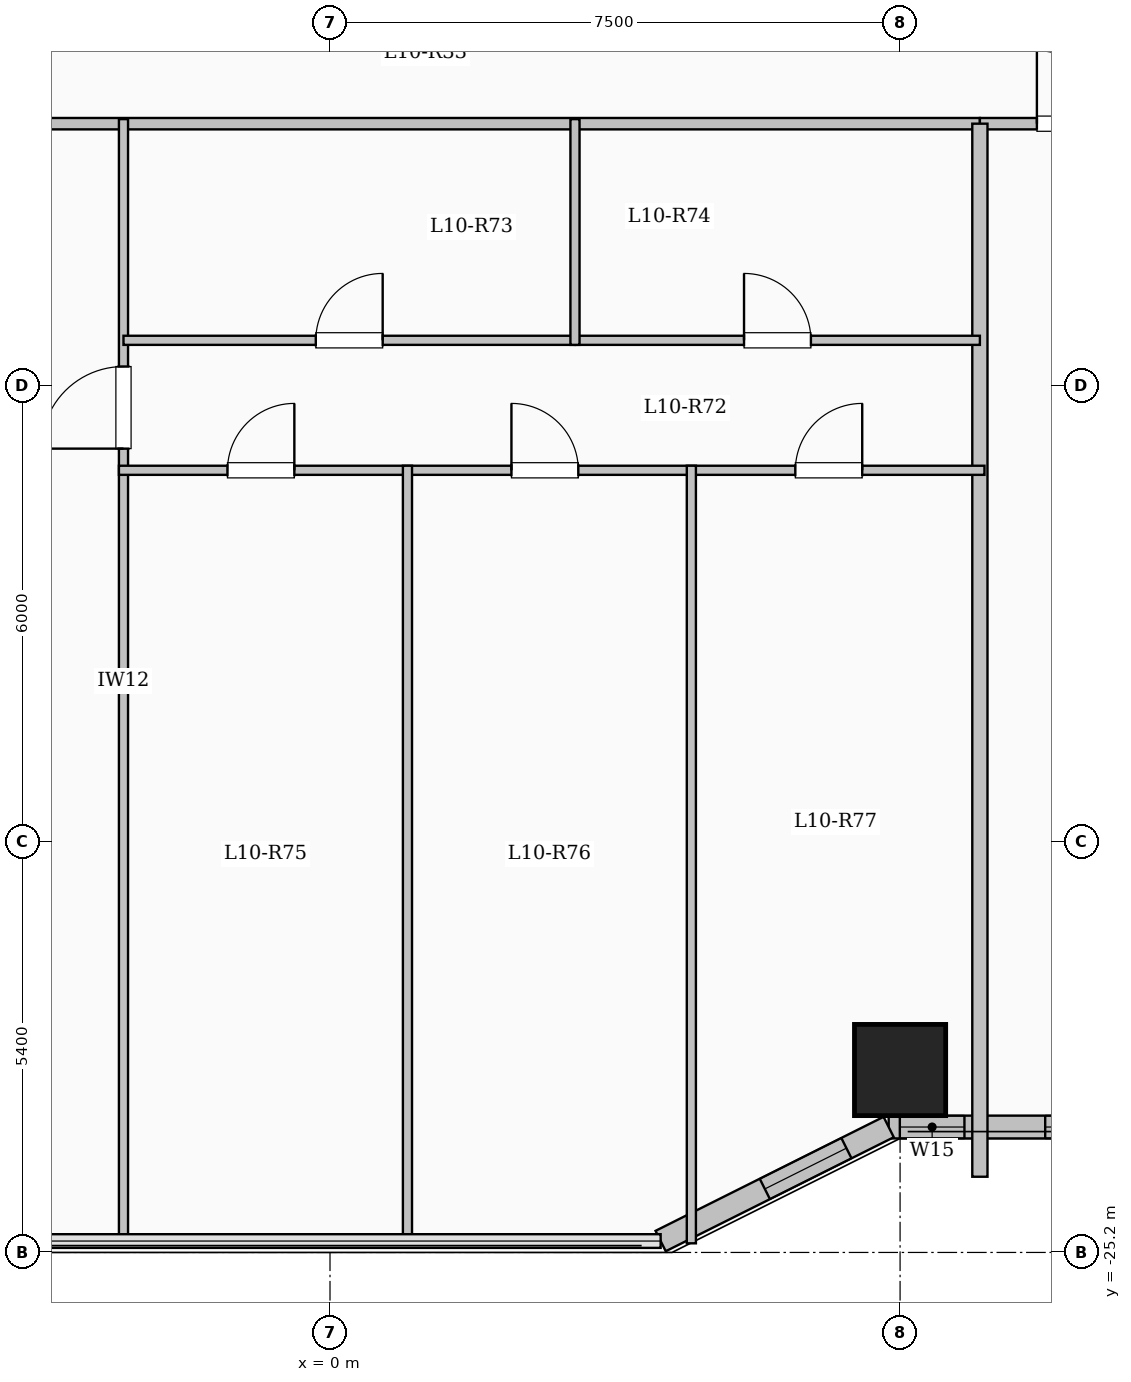
"""IFC4 building model, lengths in metres.
Left out: names, types, materials, properties, quantities, classifications, styles, units other than length and angle.
Written with IfcOpenShell. Run it as: python <this file> out.ifc"""

import sys

from ifc_helpers import new_model, si_unit, direction, frame, frame_2d, origin, origin_2d, place, context, subcontext, project, spatial, rectangle, extrude, element, fill, save


model = new_model("IFC4")
c1 = context("Model", 3, precision=1e-05, world=origin(), true_north=direction((0.0, 1.0)))
c2 = subcontext(c1, "Body", "Model", "MODEL_VIEW")
j1 = project(units=[si_unit("LENGTHUNIT", "METRE"), si_unit("PLANEANGLEUNIT", "RADIAN")], contexts=[c1])
p1 = place(None, origin())
s1 = spatial("IfcSite", under=j1, at=p1, CompositionType="ELEMENT")
p2 = place(p1, origin())
s2 = spatial("IfcBuilding", under=s1, at=p2, CompositionType="ELEMENT")
p3 = place(p2, frame((0.0, 0.0, 40.75)))
s3 = spatial("IfcBuildingStorey", under=s2, at=p3, CompositionType="ELEMENT", Elevation=40.75)
p4 = place(p3, frame((7.5, -22.8, 0.0), z_axis=(0.0, 0.0, 1.0), x_axis=(1.0, 0.0, 0.0)))
e1 = element("IfcColumn", 1, at=p4, inside=s3, PredefinedType="COLUMN", context=c2, shape_type="SweptSolid", body=[
    extrude(rectangle(XDim=1.2, YDim=1.2, at=origin_2d()), origin(), (0.0, 0.0, 1.0), 3.35),
])
p5 = place(p3, frame((22.65, -23.55, 0.0), z_axis=(0.0, 0.0, 1.0), x_axis=(-1.0, 0.0, 0.0)))
e2 = element("IfcWall", 2, at=p5, inside=s3, PredefinedType="SOLIDWALL", context=c2, shape_type="SweptSolid", body=[
    extrude(rectangle(XDim=15.3, YDim=0.3, at=frame_2d((7.65, 0.0))), origin(), (0.0, 0.0, 1.0), 3.1),
])
p6 = place(p5, frame((0.88, 0.0, 0.9)))
e3 = element("IfcOpeningElement", 3, at=p6, cuts=e2, PredefinedType="OPENING", context=c2, shape_type="SweptSolid", body=[
    extrude(rectangle(XDim=1.5, YDim=1.65, at=frame_2d((0.75, 0.825))), frame((0.0, 0.16, 0.0), z_axis=(0.0, -1.0, 0.0), x_axis=(1.0, 0.0, 0.0)), (0.0, 0.0, 1.0), 0.32),
])
p7 = place(p5, frame((4.091, 0.0, 0.9)))
e4 = element("IfcOpeningElement", 4, at=p7, cuts=e2, PredefinedType="OPENING", context=c2, shape_type="SweptSolid", body=[
    extrude(rectangle(XDim=1.5, YDim=1.65, at=frame_2d((0.75, 0.825))), frame((0.0, 0.16, 0.0), z_axis=(0.0, -1.0, 0.0), x_axis=(1.0, 0.0, 0.0)), (0.0, 0.0, 1.0), 0.32),
])
p8 = place(p5, frame((7.045, 0.0, 0.95)))
e5 = element("IfcOpeningElement", 5, at=p8, cuts=e2, PredefinedType="OPENING", context=c2, shape_type="SweptSolid", body=[
    extrude(rectangle(XDim=1.2, YDim=1.5, at=frame_2d((0.6, 0.75))), frame((0.0, 0.16, 0.0), z_axis=(0.0, -1.0, 0.0), x_axis=(1.0, 0.0, 0.0)), (0.0, 0.0, 1.0), 0.32),
])
p9 = place(p5, frame((9.212, 0.0, 0.95)))
e6 = element("IfcOpeningElement", 6, at=p9, cuts=e2, PredefinedType="OPENING", context=c2, shape_type="SweptSolid", body=[
    extrude(rectangle(XDim=1.2, YDim=1.5, at=frame_2d((0.6, 0.75))), frame((0.0, 0.16, 0.0), z_axis=(0.0, -1.0, 0.0), x_axis=(1.0, 0.0, 0.0)), (0.0, 0.0, 1.0), 0.32),
])
p10 = place(p5, frame((11.741, 0.0, 0.9)))
e7 = element("IfcOpeningElement", 7, at=p10, cuts=e2, PredefinedType="OPENING", context=c2, shape_type="SweptSolid", body=[
    extrude(rectangle(XDim=1.5, YDim=1.65, at=frame_2d((0.75, 0.825))), frame((0.0, 0.16, 0.0), z_axis=(0.0, -1.0, 0.0), x_axis=(1.0, 0.0, 0.0)), (0.0, 0.0, 1.0), 0.32),
])
p11 = place(p5, frame((14.303, 0.0, 0.95)))
e8 = element("IfcOpeningElement", 8, at=p11, cuts=e2, PredefinedType="OPENING", context=c2, shape_type="SweptSolid", body=[
    extrude(rectangle(XDim=0.85, YDim=1.5, at=frame_2d((0.425, 0.75))), frame((0.0, 0.16, 0.0), z_axis=(0.0, -1.0, 0.0), x_axis=(1.0, 0.0, 0.0)), (0.0, 0.0, 1.0), 0.32),
])
p12 = place(p3, frame((7.35, -23.55, 0.0), z_axis=(0.0, 0.0, 1.0), x_axis=(-0.894427191, -0.4472135955, 0.0)))
e9 = element("IfcWall", 9, at=p12, inside=s3, PredefinedType="SOLIDWALL", context=c2, shape_type="SweptSolid", body=[
    extrude(rectangle(XDim=3.354, YDim=0.3, at=frame_2d((1.677, 0.0))), origin(), (0.0, 0.0, 1.0), 3.1),
])
p13 = place(p12, frame((0.622, 0.0, 0.95)))
e10 = element("IfcOpeningElement", 10, at=p13, cuts=e9, PredefinedType="OPENING", context=c2, shape_type="SweptSolid", body=[
    extrude(rectangle(XDim=1.2, YDim=1.5, at=frame_2d((0.6, 0.75))), frame((0.0, 0.16, 0.0), z_axis=(0.0, -1.0, 0.0), x_axis=(1.0, 0.0, 0.0)), (0.0, 0.0, 1.0), 0.32),
])
p14 = place(p3, frame((-8.55, -10.35, 0.0), z_axis=(0.0, 0.0, 1.0), x_axis=(1.0, 0.0, 0.0)))
e11 = element("IfcWall", 11, at=p14, inside=s3, PredefinedType="PARTITIONING", context=c2, shape_type="SweptSolid", body=[
    extrude(rectangle(XDim=17.1, YDim=0.15, at=frame_2d((8.55, 0.0))), origin(), (0.0, 0.0, 1.0), 3.1),
])
p15 = place(p14, frame((0.8, 0.0, 0.0)))
e12 = element("IfcOpeningElement", 12, at=p15, cuts=e11, PredefinedType="OPENING", context=c2, shape_type="SweptSolid", body=[
    extrude(rectangle(XDim=0.96, YDim=2.15, at=frame_2d((0.48, 1.075))), frame((0.0, 0.085, 0.0), z_axis=(0.0, -1.0, 0.0), x_axis=(1.0, 0.0, 0.0)), (0.0, 0.0, 1.0), 0.17),
])
p16 = place(p3, frame((8.55, -10.35, 0.0), z_axis=(0.0, 0.0, 1.0), x_axis=(1.0, 0.0, 0.0)))
e13 = element("IfcWall", 13, at=p16, inside=s3, PredefinedType="PARTITIONING", context=c2, shape_type="SweptSolid", body=[
    extrude(rectangle(XDim=14.0, YDim=0.15, at=frame_2d((7.0, 0.0))), origin(), (0.0, 0.0, 1.0), 3.1),
])
p17 = place(p16, frame((0.75, 0.0, 0.0)))
e14 = element("IfcOpeningElement", 14, at=p17, cuts=e13, PredefinedType="OPENING", context=c2, shape_type="SweptSolid", body=[
    extrude(rectangle(XDim=0.96, YDim=2.15, at=frame_2d((0.48, 1.075))), frame((0.0, 0.085, 0.0), z_axis=(0.0, -1.0, 0.0), x_axis=(1.0, 0.0, 0.0)), (0.0, 0.0, 1.0), 0.17),
])
p18 = place(p16, frame((8.283, 0.0, 0.0)))
e15 = element("IfcOpeningElement", 15, at=p18, cuts=e13, PredefinedType="OPENING", context=c2, shape_type="SweptSolid", body=[
    extrude(rectangle(XDim=0.96, YDim=2.15, at=frame_2d((0.48, 1.075))), frame((0.0, 0.085, 0.0), z_axis=(0.0, -1.0, 0.0), x_axis=(1.0, 0.0, 0.0)), (0.0, 0.0, 1.0), 0.17),
])
p19 = place(p3, frame((8.55, -24.204, 0.0), z_axis=(0.0, 0.0, 1.0), x_axis=(0.0, 1.0, 0.0)))
e16 = element("IfcWall", 16, at=p19, inside=s3, PredefinedType="SOLIDWALL", context=c2, shape_type="SweptSolid", body=[
    extrude(rectangle(XDim=13.854, YDim=0.2, at=frame_2d((6.927, 0.0))), origin(), (0.0, 0.0, 1.0), 3.1),
])
p20 = place(p3, frame((-2.717, -25.08, 0.0), z_axis=(0.0, 0.0, 1.0), x_axis=(0.0, 1.0, 0.0)))
e17 = element("IfcWall", 17, at=p20, inside=s3, PredefinedType="PARTITIONING", context=c2, shape_type="SweptSolid", body=[
    extrude(rectangle(XDim=14.79, YDim=0.12, at=frame_2d((7.395, 0.0))), origin(), (0.0, 0.0, 1.0), 3.1),
])
p21 = place(p20, frame((10.455, 0.0, 0.0)))
e18 = element("IfcOpeningElement", 18, at=p21, cuts=e17, PredefinedType="OPENING", context=c2, shape_type="SweptSolid", body=[
    extrude(rectangle(XDim=1.08, YDim=2.15, at=frame_2d((0.54, 1.075))), frame((0.0, 0.07, 0.0), z_axis=(0.0, -1.0, 0.0), x_axis=(1.0, 0.0, 0.0)), (0.0, 0.0, 1.0), 0.14),
])
p22 = place(p3, frame((-2.717, -13.2, 0.0), z_axis=(0.0, 0.0, 1.0), x_axis=(1.0, 0.0, 0.0)))
e19 = element("IfcWall", 19, at=p22, inside=s3, PredefinedType="PARTITIONING", context=c2, shape_type="SweptSolid", body=[
    extrude(rectangle(XDim=5.94, YDim=0.12, at=frame_2d((2.97, 0.0))), origin(), (0.0, 0.0, 1.0), 3.1),
])
p23 = place(p22, frame((2.53, 0.0, 0.0)))
e20 = element("IfcOpeningElement", 20, at=p23, cuts=e19, PredefinedType="OPENING", context=c2, shape_type="SweptSolid", body=[
    extrude(rectangle(XDim=0.88, YDim=2.1, at=frame_2d((0.44, 1.05))), frame((0.0, 0.07, 0.0), z_axis=(0.0, -1.0, 0.0), x_axis=(1.0, 0.0, 0.0)), (0.0, 0.0, 1.0), 0.14),
])
p24 = place(p3, frame((3.223, -13.2, 0.0), z_axis=(0.0, 0.0, 1.0), x_axis=(1.0, 0.0, 0.0)))
e21 = element("IfcWall", 21, at=p24, inside=s3, PredefinedType="PARTITIONING", context=c2, shape_type="SweptSolid", body=[
    extrude(rectangle(XDim=5.327, YDim=0.12, at=frame_2d((2.664, 0.0))), origin(), (0.0, 0.0, 1.0), 3.1),
])
p25 = place(p24, frame((2.224, 0.0, 0.0)))
e22 = element("IfcOpeningElement", 22, at=p25, cuts=e21, PredefinedType="OPENING", context=c2, shape_type="SweptSolid", body=[
    extrude(rectangle(XDim=0.88, YDim=2.1, at=frame_2d((0.44, 1.05))), frame((0.0, 0.07, 0.0), z_axis=(0.0, -1.0, 0.0), x_axis=(1.0, 0.0, 0.0)), (0.0, 0.0, 1.0), 0.14),
])
p26 = place(p3, frame((-2.777, -14.91, 0.0), z_axis=(0.0, 0.0, 1.0), x_axis=(1.0, 0.0, 0.0)))
e23 = element("IfcWall", 23, at=p26, inside=s3, PredefinedType="PARTITIONING", context=c2, shape_type="SweptSolid", body=[
    extrude(rectangle(XDim=11.387, YDim=0.12, at=frame_2d((5.694, 0.0))), origin(), (0.0, 0.0, 1.0), 2.585),
])
p27 = place(p26, frame((1.428, 0.0, 0.0)))
e24 = element("IfcOpeningElement", 24, at=p27, cuts=e23, PredefinedType="OPENING", context=c2, shape_type="SweptSolid", body=[
    extrude(rectangle(XDim=0.88, YDim=2.1, at=frame_2d((0.44, 1.05))), frame((0.0, 0.07, 0.0), z_axis=(0.0, -1.0, 0.0), x_axis=(1.0, 0.0, 0.0)), (0.0, 0.0, 1.0), 0.14),
])
p28 = place(p26, frame((5.164, 0.0, 0.0)))
e25 = element("IfcOpeningElement", 25, at=p28, cuts=e23, PredefinedType="OPENING", context=c2, shape_type="SweptSolid", body=[
    extrude(rectangle(XDim=0.88, YDim=2.1, at=frame_2d((0.44, 1.05))), frame((0.0, 0.07, 0.0), z_axis=(0.0, -1.0, 0.0), x_axis=(1.0, 0.0, 0.0)), (0.0, 0.0, 1.0), 0.14),
])
p29 = place(p26, frame((8.899, 0.0, 0.0)))
e26 = element("IfcOpeningElement", 26, at=p29, cuts=e23, PredefinedType="OPENING", context=c2, shape_type="SweptSolid", body=[
    extrude(rectangle(XDim=0.88, YDim=2.1, at=frame_2d((0.44, 1.05))), frame((0.0, 0.07, 0.0), z_axis=(0.0, -1.0, 0.0), x_axis=(1.0, 0.0, 0.0)), (0.0, 0.0, 1.0), 0.14),
])
p30 = place(p3, frame((3.223, -13.26, 0.0), z_axis=(0.0, 0.0, 1.0), x_axis=(0.0, 1.0, 0.0)))
e27 = element("IfcWall", 27, at=p30, inside=s3, PredefinedType="PARTITIONING", context=c2, shape_type="SweptSolid", body=[
    extrude(rectangle(XDim=2.97, YDim=0.12, at=frame_2d((1.485, 0.0))), origin(), (0.0, 0.0, 1.0), 3.1),
])
for number, where, z_axis, x_axis in (
    (28, (1.019, -25.08, 0.0), (0.0, 0.0, 1.0), (0.0, 1.0, 0.0)),
    (29, (4.754, -25.08, 0.0), (0.0, 0.0, 1.0), (0.0, 1.0, 0.0)),
):
    element("IfcWall", number, at=place(p3, frame(where, z_axis=z_axis, x_axis=x_axis)), inside=s3, PredefinedType="PARTITIONING", context=c2, shape_type="SweptSolid", body=[
        extrude(rectangle(XDim=10.23, YDim=0.12, at=frame_2d((5.115, 0.0))), origin(), (0.0, 0.0, 1.0), 3.1),
    ])
p31 = place(p10, origin())
e30 = element("IfcWindow", 30, at=p31, inside=s3, PartitioningType="SINGLE_PANEL", PredefinedType="WINDOW", context=c2, shape_type="SweptSolid", body=[
    extrude(rectangle(XDim=1.5, YDim=1.65, at=frame_2d((0.75, 0.825))), frame((0.0, 0.03, 0.0), z_axis=(0.0, -1.0, 0.0), x_axis=(1.0, 0.0, 0.0)), (0.0, 0.0, 1.0), 0.06),
])
fill(e7, e30)
p32 = place(p11, origin())
e31 = element("IfcWindow", 31, at=p32, inside=s3, PartitioningType="SINGLE_PANEL", PredefinedType="WINDOW", context=c2, shape_type="SweptSolid", body=[
    extrude(rectangle(XDim=0.85, YDim=1.5, at=frame_2d((0.425, 0.75))), frame((0.0, 0.03, 0.0), z_axis=(0.0, -1.0, 0.0), x_axis=(1.0, 0.0, 0.0)), (0.0, 0.0, 1.0), 0.06),
])
fill(e8, e31)
p33 = place(p13, origin())
e32 = element("IfcWindow", 32, at=p33, inside=s3, PartitioningType="SINGLE_PANEL", PredefinedType="WINDOW", context=c2, shape_type="SweptSolid", body=[
    extrude(rectangle(XDim=1.2, YDim=1.5, at=frame_2d((0.6, 0.75))), frame((0.0, 0.03, 0.0), z_axis=(0.0, -1.0, 0.0), x_axis=(1.0, 0.0, 0.0)), (0.0, 0.0, 1.0), 0.06),
])
fill(e10, e32)
p34 = place(p17, origin())
e33 = element("IfcDoor", 33, at=p34, inside=s3, OperationType="SINGLE_SWING_LEFT", PredefinedType="DOOR", context=c2, shape_type="SweptSolid", body=[
    extrude(rectangle(XDim=0.96, YDim=2.15, at=frame_2d((0.48, 1.075))), frame((0.0, 0.025, 0.0), z_axis=(0.0, -1.0, 0.0), x_axis=(1.0, 0.0, 0.0)), (0.0, 0.0, 1.0), 0.05),
])
fill(e14, e33)
p35 = place(p21, origin())
e34 = element("IfcDoor", 34, at=p35, inside=s3, OperationType="SINGLE_SWING_LEFT", PredefinedType="DOOR", context=c2, shape_type="SweptSolid", body=[
    extrude(rectangle(XDim=1.08, YDim=2.15, at=frame_2d((0.54, 1.075))), frame((0.0, 0.025, 0.0), z_axis=(0.0, -1.0, 0.0), x_axis=(1.0, 0.0, 0.0)), (0.0, 0.0, 1.0), 0.05),
])
fill(e18, e34)
p36 = place(p23, origin())
e35 = element("IfcDoor", 35, at=p36, inside=s3, OperationType="SINGLE_SWING_RIGHT", PredefinedType="DOOR", context=c2, shape_type="SweptSolid", body=[
    extrude(rectangle(XDim=0.88, YDim=2.1, at=frame_2d((0.44, 1.05))), frame((0.0, 0.025, 0.0), z_axis=(0.0, -1.0, 0.0), x_axis=(1.0, 0.0, 0.0)), (0.0, 0.0, 1.0), 0.05),
])
fill(e20, e35)
p37 = place(p25, origin())
e36 = element("IfcDoor", 36, at=p37, inside=s3, OperationType="SINGLE_SWING_LEFT", PredefinedType="DOOR", context=c2, shape_type="SweptSolid", body=[
    extrude(rectangle(XDim=0.88, YDim=2.1, at=frame_2d((0.44, 1.05))), frame((0.0, 0.025, 0.0), z_axis=(0.0, -1.0, 0.0), x_axis=(1.0, 0.0, 0.0)), (0.0, 0.0, 1.0), 0.05),
])
fill(e22, e36)
p38 = place(p27, origin())
e37 = element("IfcDoor", 37, at=p38, inside=s3, OperationType="SINGLE_SWING_RIGHT", PredefinedType="DOOR", context=c2, shape_type="SweptSolid", body=[
    extrude(rectangle(XDim=0.88, YDim=2.1, at=frame_2d((0.44, 1.05))), frame((0.0, 0.025, 0.0), z_axis=(0.0, -1.0, 0.0), x_axis=(1.0, 0.0, 0.0)), (0.0, 0.0, 1.0), 0.05),
])
fill(e24, e37)
p39 = place(p28, origin())
e38 = element("IfcDoor", 38, at=p39, inside=s3, OperationType="SINGLE_SWING_LEFT", PredefinedType="DOOR", context=c2, shape_type="SweptSolid", body=[
    extrude(rectangle(XDim=0.88, YDim=2.1, at=frame_2d((0.44, 1.05))), frame((0.0, 0.025, 0.0), z_axis=(0.0, -1.0, 0.0), x_axis=(1.0, 0.0, 0.0)), (0.0, 0.0, 1.0), 0.05),
])
fill(e25, e38)
p40 = place(p29, origin())
e39 = element("IfcDoor", 39, at=p40, inside=s3, OperationType="SINGLE_SWING_RIGHT", PredefinedType="DOOR", context=c2, shape_type="SweptSolid", body=[
    extrude(rectangle(XDim=0.88, YDim=2.1, at=frame_2d((0.44, 1.05))), frame((0.0, 0.025, 0.0), z_axis=(0.0, -1.0, 0.0), x_axis=(1.0, 0.0, 0.0)), (0.0, 0.0, 1.0), 0.05),
])
fill(e26, e39)
save(model, sys.argv[1])
